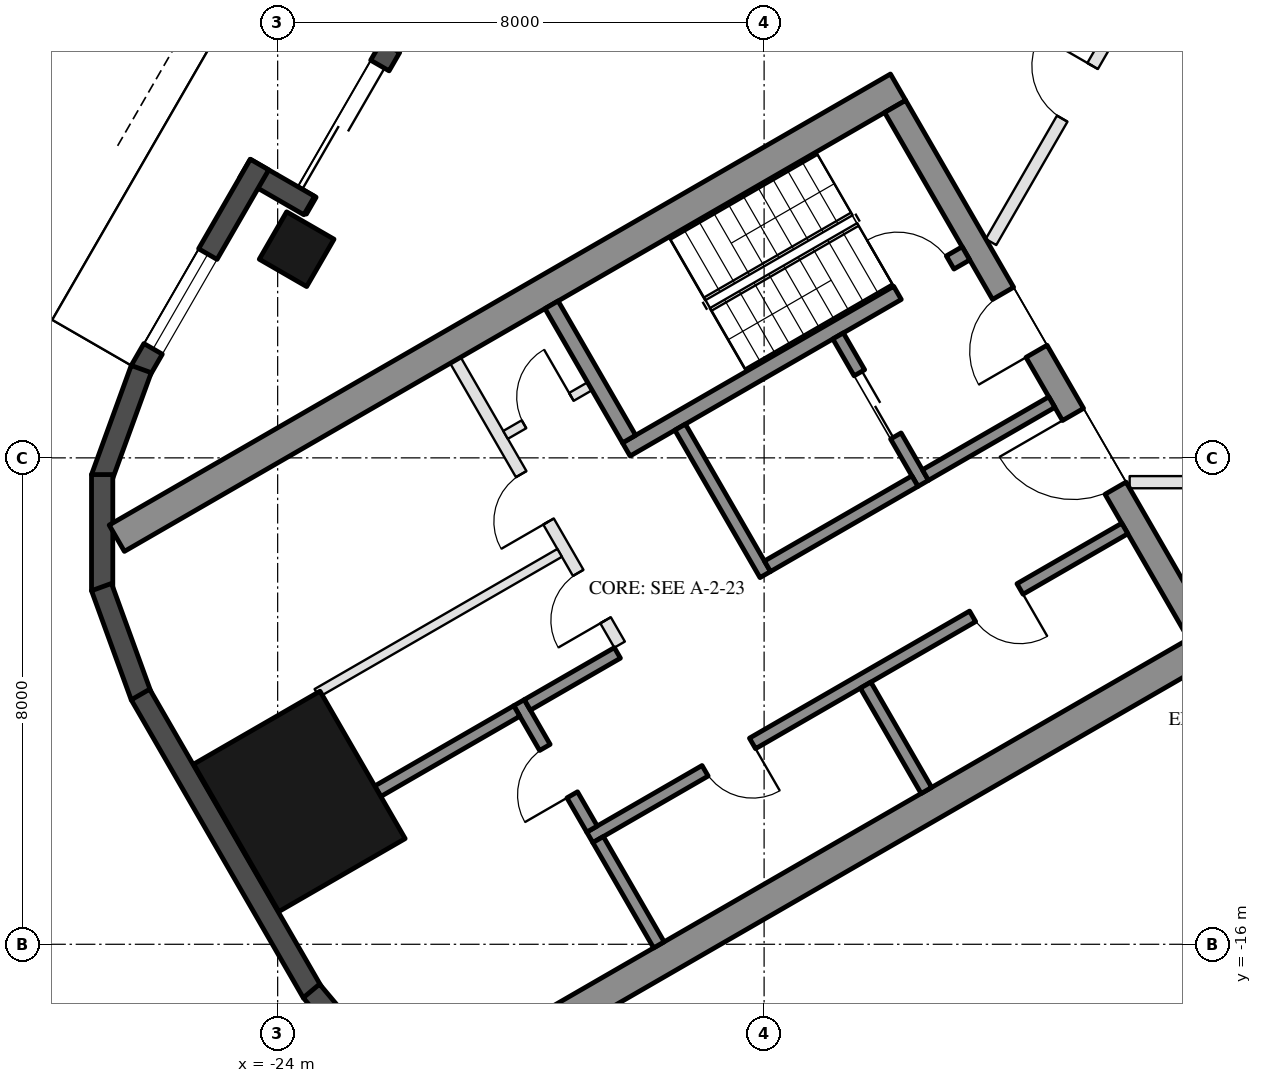
"""IFC4 building model, lengths in metres.
Left out: names, types, materials, properties, quantities, classifications, styles, units other than length and angle.
Written with IfcOpenShell. Run it as: python <this file> out.ifc"""

import sys

from ifc_helpers import new_model, si_unit, direction, frame, frame_2d, origin, origin_2d, place, context, subcontext, project, spatial, rectangle, hollow_rectangle, extrude, element, fill, save


model = new_model("IFC4")
c1 = context("Model", 3, precision=1e-05, world=origin(), true_north=direction((0.0, 1.0)))
c2 = subcontext(c1, "Body", "Model", "MODEL_VIEW")
j1 = project(units=[si_unit("LENGTHUNIT", "METRE"), si_unit("PLANEANGLEUNIT", "RADIAN")], contexts=[c1])
p1 = place(None, origin())
s1 = spatial("IfcSite", under=j1, at=p1, CompositionType="ELEMENT")
p2 = place(p1, origin())
s2 = spatial("IfcBuilding", under=s1, at=p2, CompositionType="ELEMENT")
p3 = place(p2, frame((0.0, 0.0, 105.7)))
s3 = spatial("IfcBuildingStorey", under=s2, at=p3, CompositionType="ELEMENT", Elevation=105.7)
p4 = place(p3, frame((-23.688, -4.568, 0.0), z_axis=(0.0, 0.0, 1.0), x_axis=(0.5, 0.866025403784, 0.0)))
e1 = element("IfcColumn", 1, at=p4, inside=s3, PredefinedType="COLUMN", context=c2, shape_type="SweptSolid", body=[
    extrude(hollow_rectangle(XDim=0.9, YDim=0.9, WallThickness=0.04, at=origin_2d()), origin(), (0.0, 0.0, 1.0), 3.7),
])
p5 = place(p3, frame((-23.643, -13.65, 0.0), z_axis=(0.0, 0.0, 1.0), x_axis=(-0.5, 0.866025403784, 0.0)))
e2 = element("IfcColumn", 2, at=p5, inside=s3, PredefinedType="COLUMN", context=c2, shape_type="SweptSolid", body=[
    extrude(hollow_rectangle(XDim=2.8, YDim=2.4, WallThickness=0.07, at=origin_2d()), origin(), (0.0, 0.0, 1.0), 3.7),
])
p6 = place(p3, frame((-20.309, 1.934, 0.0), z_axis=(0.0, 0.0, 1.0), x_axis=(-0.499992114976, -0.866029956157, 0.0)))
e3 = element("IfcWall", 3, at=p6, inside=s3, PredefinedType="SOLIDWALL", context=c2, shape_type="SweptSolid", body=[
    extrude(rectangle(XDim=6.74, YDim=0.35, at=frame_2d((3.37, 0.0))), origin(), (0.0, 0.0, 1.0), 3.55),
])
p7 = place(p6, frame((4.02, 0.0, 0.0)))
e4 = element("IfcOpeningElement", 4, at=p7, cuts=e3, PredefinedType="OPENING", context=c2, shape_type="SweptSolid", body=[
    extrude(rectangle(XDim=2.4, YDim=2.4, at=frame_2d((1.2, 1.2))), frame((0.0, 0.185, 0.0), z_axis=(0.0, -1.0, 0.0), x_axis=(1.0, 0.0, 0.0)), (0.0, 0.0, 1.0), 0.37),
])
p8 = place(p6, frame((0.77, 0.0, 0.3)))
e5 = element("IfcOpeningElement", 5, at=p8, cuts=e3, PredefinedType="OPENING", context=c2, shape_type="SweptSolid", body=[
    extrude(rectangle(XDim=2.9, YDim=2.65, at=frame_2d((1.45, 1.325))), frame((0.0, 0.185, 0.0), z_axis=(0.0, -1.0, 0.0), x_axis=(1.0, 0.0, 0.0)), (0.0, 0.0, 1.0), 0.37),
])
p9 = place(p3, frame((-23.481, -3.85, 0.0), z_axis=(0.0, 0.0, 1.0), x_axis=(-0.866092288191, 0.499884134912, 0.0)))
e6 = element("IfcWall", 6, at=p9, inside=s3, PredefinedType="SOLIDWALL", context=c2, shape_type="SweptSolid", body=[
    extrude(rectangle(XDim=1.22, YDim=0.35, at=frame_2d((0.61, 0.0))), origin(), (0.0, 0.0, 1.0), 3.55),
])
p10 = place(p3, frame((-24.299, -3.176, 0.0), z_axis=(0.0, 0.0, 1.0), x_axis=(-0.500028278809, -0.866009076391, 0.0)))
e7 = element("IfcWall", 7, at=p10, inside=s3, PredefinedType="SOLIDWALL", context=c2, shape_type="SweptSolid", body=[
    extrude(rectangle(XDim=3.916, YDim=0.35, at=frame_2d((1.958, 0.0))), origin(), (0.0, 0.0, 1.0), 3.55),
])
p11 = place(p10, frame((1.7, 0.0, 0.3)))
e8 = element("IfcOpeningElement", 8, at=p11, cuts=e7, PredefinedType="OPENING", context=c2, shape_type="SweptSolid", body=[
    extrude(rectangle(XDim=1.8, YDim=2.65, at=frame_2d((0.9, 1.325))), frame((0.0, 0.185, 0.0), z_axis=(0.0, -1.0, 0.0), x_axis=(1.0, 0.0, 0.0)), (0.0, 0.0, 1.0), 0.37),
])
for number, where, z_axis, x_axis in (
    (9, (-26.244, -6.54, 0.0), (0.0, 0.0, 1.0), (-0.342, -0.94, 0.0)),
    (10, (-26.886, -8.275, 0.0), (0.0, 0.0, 1.0), (0.0, -1.0, 0.0)),
    (11, (-26.897, -10.125, 0.0), (0.0, 0.0, 1.0), (0.342, -0.94, 0.0)),
):
    element("IfcWall", number, at=place(p3, frame(where, z_axis=z_axis, x_axis=x_axis)), inside=s3, PredefinedType="SOLIDWALL", context=c2, shape_type="SweptSolid", body=[
        extrude(rectangle(XDim=1.91, YDim=0.35, at=frame_2d((0.955, 0.0))), origin(), (0.0, 0.0, 1.0), 3.55),
    ])
p12 = place(p3, frame((-26.257, -11.893, 0.0), z_axis=(0.0, 0.0, 1.0), x_axis=(0.500018773155, -0.866014564827, 0.0)))
e12 = element("IfcWall", 12, at=p12, inside=s3, PredefinedType="SOLIDWALL", context=c2, shape_type="SweptSolid", body=[
    extrude(rectangle(XDim=5.658, YDim=0.35, at=frame_2d((2.829, 0.0))), origin(), (0.0, 0.0, 1.0), 3.55),
])
p13 = place(p3, frame((-23.445, -16.768, 0.0), z_axis=(0.0, 0.0, 1.0), x_axis=(0.642733291068, -0.76609001857, 0.0)))
e13 = element("IfcWall", 13, at=p13, inside=s3, PredefinedType="SOLIDWALL", context=c2, shape_type="SweptSolid", body=[
    extrude(rectangle(XDim=1.91, YDim=0.35, at=frame_2d((0.955, 0.0))), origin(), (0.0, 0.0, 1.0), 3.55),
])
for number, where, z_axis, x_axis in (
    (14, (-13.797, -1.903, 0.0), (0.0, 0.0, 1.0), (-0.866, -0.5, 0.0)),
    (15, (-8.547, -10.997, 0.0), (0.0, 0.0, 1.0), (-0.866, -0.5, 0.0)),
):
    element("IfcWall", number, at=place(p3, frame(where, z_axis=z_axis, x_axis=x_axis)), inside=s3, PredefinedType="SHEAR", context=c2, shape_type="SweptSolid", body=[
        extrude(rectangle(XDim=14.837, YDim=0.5, at=frame_2d((7.418, 0.0))), origin(), (0.0, 0.0, 1.0), 3.5),
    ])
p14 = place(p3, frame((-13.845, -2.22, 0.0), z_axis=(0.0, 0.0, 1.0), x_axis=(0.500004234368, -0.866022959057, 0.0)))
e16 = element("IfcWall", 16, at=p14, inside=s3, PredefinedType="SHEAR", context=c2, shape_type="SweptSolid", body=[
    extrude(rectangle(XDim=10.0, YDim=0.4, at=frame_2d((5.0, 0.0))), origin(), (0.0, 0.0, 1.0), 3.5),
])
p15 = place(p14, frame((3.55, 0.0, 0.0)))
e17 = element("IfcOpeningElement", 17, at=p15, cuts=e16, PredefinedType="OPENING", context=c2, shape_type="SweptSolid", body=[
    extrude(rectangle(XDim=1.1, YDim=2.1, at=frame_2d((0.55, 1.05))), frame((0.0, 0.21, 0.0), z_axis=(0.0, -1.0, 0.0), x_axis=(1.0, 0.0, 0.0)), (0.0, 0.0, 1.0), 0.42),
])
p16 = place(p14, frame((5.85, 0.0, 0.0)))
e18 = element("IfcOpeningElement", 18, at=p16, cuts=e16, PredefinedType="OPENING", context=c2, shape_type="SweptSolid", body=[
    extrude(rectangle(XDim=1.4, YDim=2.1, at=frame_2d((0.7, 1.05))), frame((0.0, 0.21, 0.0), z_axis=(0.0, -1.0, 0.0), x_axis=(1.0, 0.0, 0.0)), (0.0, 0.0, 1.0), 0.42),
])
p17 = place(p3, frame((-12.681, -4.636, 0.0), z_axis=(0.0, 0.0, 1.0), x_axis=(-0.866021702275, -0.500006411147, 0.0)))
e19 = element("IfcWall", 19, at=p17, inside=s3, PredefinedType="SHEAR", context=c2, shape_type="SweptSolid", body=[
    extrude(rectangle(XDim=6.45, YDim=0.25, at=frame_2d((3.225, 0.0))), origin(), (0.0, 0.0, 1.0), 3.5),
])
p18 = place(p17, frame((0.3, 0.0, 0.0)))
e20 = element("IfcOpeningElement", 20, at=p18, cuts=e19, PredefinedType="OPENING", context=c2, shape_type="SweptSolid", body=[
    extrude(rectangle(XDim=1.0, YDim=2.1, at=frame_2d((0.5, 1.05))), frame((0.0, 0.135, 0.0), z_axis=(0.0, -1.0, 0.0), x_axis=(1.0, 0.0, 0.0)), (0.0, 0.0, 1.0), 0.27),
])
p19 = place(p3, frame((-19.496, -5.482, 0.0), z_axis=(0.0, 0.0, 1.0), x_axis=(0.499990435942, -0.866030925526, 0.0)))
e21 = element("IfcWall", 21, at=p19, inside=s3, PredefinedType="SHEAR", context=c2, shape_type="SweptSolid", body=[
    extrude(rectangle(XDim=2.55, YDim=0.25, at=frame_2d((1.275, 0.0))), origin(), (0.0, 0.0, 1.0), 3.5),
])
p20 = place(p3, frame((-17.381, -7.495, 0.0), z_axis=(0.0, 0.0, 1.0), x_axis=(0.500011755427, -0.866018616679, 0.0)))
e22 = element("IfcWall", 22, at=p20, inside=s3, PredefinedType="SHEAR", context=c2, shape_type="SweptSolid", body=[
    extrude(rectangle(XDim=2.8, YDim=0.2, at=frame_2d((1.4, 0.0))), origin(), (0.0, 0.0, 1.0), 3.5),
])
p21 = place(p3, frame((-14.783, -5.995, 0.0), z_axis=(0.0, 0.0, 1.0), x_axis=(0.49994636267, -0.866056369097, 0.0)))
e23 = element("IfcWall", 23, at=p21, inside=s3, PredefinedType="SHEAR", context=c2, shape_type="SweptSolid", body=[
    extrude(rectangle(XDim=2.8, YDim=0.2, at=frame_2d((1.4, 0.0))), origin(), (0.0, 0.0, 1.0), 3.5),
])
p22 = place(p21, frame((0.7, 0.0, 0.0)))
e24 = element("IfcOpeningElement", 24, at=p22, cuts=e23, PredefinedType="OPENING", context=c2, shape_type="SweptSolid", body=[
    extrude(rectangle(XDim=1.2, YDim=2.1, at=frame_2d((0.6, 1.05))), frame((0.0, 0.11, 0.0), z_axis=(0.0, -1.0, 0.0), x_axis=(1.0, 0.0, 0.0)), (0.0, 0.0, 1.0), 0.22),
])
p23 = place(p3, frame((-13.52, -8.383, 0.0), z_axis=(0.0, 0.0, 1.0), x_axis=(-0.866034573852, -0.49998411664, 0.0)))
e25 = element("IfcWall", 25, at=p23, inside=s3, PredefinedType="SHEAR", context=c2, shape_type="SweptSolid", body=[
    extrude(rectangle(XDim=2.8, YDim=0.2, at=frame_2d((1.4, 0.0))), origin(), (0.0, 0.0, 1.0), 3.5),
])
p24 = place(p3, frame((-11.268, -7.083, 0.0), z_axis=(0.0, 0.0, 1.0), x_axis=(-0.866050077142, -0.499957262057, 0.0)))
e26 = element("IfcWall", 26, at=p24, inside=s3, PredefinedType="SHEAR", context=c2, shape_type="SweptSolid", body=[
    extrude(rectangle(XDim=2.4, YDim=0.2, at=frame_2d((1.2, 0.0))), origin(), (0.0, 0.0, 1.0), 3.5),
])
p25 = place(p3, frame((-10.068, -9.162, 0.0), z_axis=(0.0, 0.0, 1.0), x_axis=(-0.866032725843, -0.499987317609, 0.0)))
e27 = element("IfcWall", 27, at=p25, inside=s3, PredefinedType="SHEAR", context=c2, shape_type="SweptSolid", body=[
    extrude(rectangle(XDim=10.16, YDim=0.2, at=frame_2d((5.08, 0.0))), origin(), (0.0, 0.0, 1.0), 3.5),
])
p26 = place(p25, frame((1.99, 0.0, 0.0)))
e28 = element("IfcOpeningElement", 28, at=p26, cuts=e27, PredefinedType="OPENING", context=c2, shape_type="SweptSolid", body=[
    extrude(rectangle(XDim=0.9, YDim=2.1, at=frame_2d((0.45, 1.05))), frame((0.0, 0.11, 0.0), z_axis=(0.0, -1.0, 0.0), x_axis=(1.0, 0.0, 0.0)), (0.0, 0.0, 1.0), 0.22),
])
p27 = place(p25, frame((7.07, 0.0, 0.0)))
e29 = element("IfcOpeningElement", 29, at=p27, cuts=e27, PredefinedType="OPENING", context=c2, shape_type="SweptSolid", body=[
    extrude(rectangle(XDim=0.9, YDim=2.1, at=frame_2d((0.45, 1.05))), frame((0.0, 0.11, 0.0), z_axis=(0.0, -1.0, 0.0), x_axis=(1.0, 0.0, 0.0)), (0.0, 0.0, 1.0), 0.22),
])
p28 = place(p3, frame((-20.031, -12.026, 0.0), z_axis=(0.0, 0.0, 1.0), x_axis=(0.500033551112, -0.866006032174, 0.0)))
e30 = element("IfcWall", 30, at=p28, inside=s3, PredefinedType="SHEAR", context=c2, shape_type="SweptSolid", body=[
    extrude(rectangle(XDim=2.4, YDim=0.2, at=frame_2d((1.2, 0.0))), origin(), (0.0, 0.0, 1.0), 3.5),
])
p29 = place(p28, frame((0.85, 0.0, 0.0)))
e31 = element("IfcOpeningElement", 31, at=p29, cuts=e30, PredefinedType="OPENING", context=c2, shape_type="SweptSolid", body=[
    extrude(rectangle(XDim=0.9, YDim=2.1, at=frame_2d((0.45, 1.05))), frame((0.0, 0.11, 0.0), z_axis=(0.0, -1.0, 0.0), x_axis=(1.0, 0.0, 0.0)), (0.0, 0.0, 1.0), 0.22),
])
p30 = place(p3, frame((-18.413, -11.208, 0.0), z_axis=(0.0, 0.0, 1.0), x_axis=(-0.866038183914, -0.499977863513, 0.0)))
e32 = element("IfcWall", 32, at=p30, inside=s3, PredefinedType="SHEAR", context=c2, shape_type="SweptSolid", body=[
    extrude(rectangle(XDim=1.71, YDim=0.2, at=frame_2d((0.855, 0.0))), origin(), (0.0, 0.0, 1.0), 3.5),
])
for number, where, z_axis, x_axis in (
    (33, (-14.331, -11.738, 0.0), (0.0, 0.0, 1.0), (0.5, -0.866, 0.0)),
    (34, (-18.73, -14.278, 0.0), (0.0, 0.0, 1.0), (0.5, -0.866, 0.0)),
):
    element("IfcWall", number, at=place(p3, frame(where, z_axis=z_axis, x_axis=x_axis)), inside=s3, PredefinedType="SHEAR", context=c2, shape_type="SweptSolid", body=[
        extrude(rectangle(XDim=2.0, YDim=0.2, at=frame_2d((1.0, 0.0))), origin(), (0.0, 0.0, 1.0), 3.5),
    ])
p31 = place(p3, frame((-20.067, -12.163, 0.0), z_axis=(0.0, 0.0, 1.0), x_axis=(-0.866060851709, -0.499938597367, 0.0)))
e35 = element("IfcWall", 35, at=p31, inside=s3, PredefinedType="SHEAR", context=c2, shape_type="SweptSolid", body=[
    extrude(rectangle(XDim=2.64, YDim=0.2, at=frame_2d((1.32, 0.0))), origin(), (0.0, 0.0, 1.0), 3.5),
])
p32 = place(p3, frame((-21.076, -6.395, 0.0), z_axis=(0.0, 0.0, 1.0), x_axis=(0.50001468107, -0.866016927499, 0.0)))
e36 = element("IfcWall", 36, at=p32, inside=s3, PredefinedType="PARTITIONING", context=c2, shape_type="SweptSolid", body=[
    extrude(rectangle(XDim=5.4, YDim=0.2, at=frame_2d((2.7, 0.0))), origin(), (0.0, 0.0, 1.0), 3.5),
])
p33 = place(p32, frame((2.163, 0.0, 0.0)))
e37 = element("IfcOpeningElement", 37, at=p33, cuts=e36, PredefinedType="OPENING", context=c2, shape_type="SweptSolid", body=[
    extrude(rectangle(XDim=0.9, YDim=2.1, at=frame_2d((0.45, 1.05))), frame((0.0, 0.11, 0.0), z_axis=(0.0, -1.0, 0.0), x_axis=(1.0, 0.0, 0.0)), (0.0, 0.0, 1.0), 0.22),
])
p34 = place(p32, frame((4.038, 0.0, 0.0)))
e38 = element("IfcOpeningElement", 38, at=p34, cuts=e36, PredefinedType="OPENING", context=c2, shape_type="SweptSolid", body=[
    extrude(rectangle(XDim=0.9, YDim=2.1, at=frame_2d((0.45, 1.05))), frame((0.0, 0.11, 0.0), z_axis=(0.0, -1.0, 0.0), x_axis=(1.0, 0.0, 0.0)), (0.0, 0.0, 1.0), 0.22),
])
p35 = place(p3, frame((-18.866, -6.822, 0.0), z_axis=(0.0, 0.0, 1.0), x_axis=(-0.866028054938, -0.499995408039, 0.0)))
e39 = element("IfcWall", 39, at=p35, inside=s3, PredefinedType="PARTITIONING", context=c2, shape_type="SweptSolid", body=[
    extrude(rectangle(XDim=1.6, YDim=0.15, at=frame_2d((0.8, 0.0))), origin(), (0.0, 0.0, 1.0), 3.5),
])
p36 = place(p35, frame((0.35, 0.0, 0.0)))
e40 = element("IfcOpeningElement", 40, at=p36, cuts=e39, PredefinedType="OPENING", context=c2, shape_type="SweptSolid", body=[
    extrude(rectangle(XDim=0.9, YDim=2.1, at=frame_2d((0.45, 1.05))), frame((0.0, 0.085, 0.0), z_axis=(0.0, -1.0, 0.0), x_axis=(1.0, 0.0, 0.0)), (0.0, 0.0, 1.0), 0.17),
])
p37 = place(p3, frame((-19.363, -9.562, 0.0), z_axis=(0.0, 0.0, 1.0), x_axis=(-0.86601185002, -0.500023475074, 0.0)))
e41 = element("IfcWall", 41, at=p37, inside=s3, PredefinedType="PARTITIONING", context=c2, shape_type="SweptSolid", body=[
    extrude(rectangle(XDim=4.61, YDim=0.15, at=frame_2d((2.305, 0.0))), origin(), (0.0, 0.0, 1.0), 3.5),
])
p38 = place(p3, frame((-5.1, -8.4, 0.0), z_axis=(0.0, 0.0, 1.0), x_axis=(-1.0, 0.0, 0.0)))
e42 = element("IfcWall", 42, at=p38, inside=s3, PredefinedType="PARTITIONING", context=c2, shape_type="SweptSolid", body=[
    extrude(rectangle(XDim=4.888, YDim=0.2, at=frame_2d((2.444, 0.0))), origin(), (0.0, 0.0, 1.0), 2.95),
])
p39 = place(p38, frame((1.944, 0.0, 0.0)))
e43 = element("IfcOpeningElement", 43, at=p39, cuts=e42, PredefinedType="OPENING", context=c2, shape_type="SweptSolid", body=[
    extrude(rectangle(XDim=1.0, YDim=2.1, at=frame_2d((0.5, 1.05))), frame((0.0, 0.11, 0.0), z_axis=(0.0, -1.0, 0.0), x_axis=(1.0, 0.0, 0.0)), (0.0, 0.0, 1.0), 0.22),
])
p40 = place(p3, frame((-12.269, -4.45, 0.0), z_axis=(0.0, 0.0, 1.0), x_axis=(0.50001360338, 0.866017549727, 0.0)))
e44 = element("IfcWall", 44, at=p40, inside=s3, PredefinedType="PARTITIONING", context=c2, shape_type="SweptSolid", body=[
    extrude(rectangle(XDim=5.686, YDim=0.2, at=frame_2d((2.843, 0.0))), origin(), (0.0, 0.0, 1.0), 2.95),
])
p41 = place(p40, frame((2.343, 0.0, 0.0)))
e45 = element("IfcOpeningElement", 45, at=p41, cuts=e44, PredefinedType="OPENING", context=c2, shape_type="SweptSolid", body=[
    extrude(rectangle(XDim=1.0, YDim=2.1, at=frame_2d((0.5, 1.05))), frame((0.0, 0.11, 0.0), z_axis=(0.0, -1.0, 0.0), x_axis=(1.0, 0.0, 0.0)), (0.0, 0.0, 1.0), 0.22),
])
p42 = place(p7, frame((2.4, 0.0, 0.0), z_axis=(0.0, 0.0, 1.0), x_axis=(-1.0, 0.0, 0.0)))
e46 = element("IfcDoor", 46, at=p42, inside=s3, OperationType="SLIDING_TO_LEFT", PredefinedType="DOOR", context=c2, shape_type="SweptSolid", body=[
    extrude(rectangle(XDim=2.4, YDim=2.4, at=frame_2d((1.2, 1.2))), frame((0.0, 0.025, 0.0), z_axis=(0.0, -1.0, 0.0), x_axis=(1.0, 0.0, 0.0)), (0.0, 0.0, 1.0), 0.05),
])
fill(e4, e46)
p43 = place(p11, origin())
e47 = element("IfcWindow", 47, at=p43, inside=s3, PartitioningType="SINGLE_PANEL", PredefinedType="WINDOW", context=c2, shape_type="SweptSolid", body=[
    extrude(rectangle(XDim=1.8, YDim=2.65, at=frame_2d((0.9, 1.325))), frame((0.0, 0.03, 0.0), z_axis=(0.0, -1.0, 0.0), x_axis=(1.0, 0.0, 0.0)), (0.0, 0.0, 1.0), 0.06),
])
fill(e8, e47)
p44 = place(p22, origin())
e48 = element("IfcDoor", 48, at=p44, inside=s3, OperationType="DOUBLE_DOOR_SLIDING", PredefinedType="DOOR", context=c2, shape_type="SweptSolid", body=[
    extrude(rectangle(XDim=1.2, YDim=2.1, at=frame_2d((0.6, 1.05))), frame((0.0, 0.025, 0.0), z_axis=(0.0, -1.0, 0.0), x_axis=(1.0, 0.0, 0.0)), (0.0, 0.0, 1.0), 0.05),
])
fill(e24, e48)
p45 = place(p36, frame((0.9, 0.0, 0.0), z_axis=(0.0, 0.0, 1.0), x_axis=(-1.0, 0.0, 0.0)))
e49 = element("IfcDoor", 49, at=p45, inside=s3, OperationType="SINGLE_SWING_RIGHT", PredefinedType="DOOR", context=c2, shape_type="SweptSolid", body=[
    extrude(rectangle(XDim=0.9, YDim=2.1, at=frame_2d((0.45, 1.05))), frame((0.0, 0.025, 0.0), z_axis=(0.0, -1.0, 0.0), x_axis=(1.0, 0.0, 0.0)), (0.0, 0.0, 1.0), 0.05),
])
fill(e40, e49)
p46 = place(p26, origin())
e50 = element("IfcDoor", 50, at=p46, inside=s3, OperationType="SINGLE_SWING_LEFT", PredefinedType="DOOR", context=c2, shape_type="SweptSolid", body=[
    extrude(rectangle(XDim=0.9, YDim=2.1, at=frame_2d((0.45, 1.05))), frame((0.0, 0.025, 0.0), z_axis=(0.0, -1.0, 0.0), x_axis=(1.0, 0.0, 0.0)), (0.0, 0.0, 1.0), 0.05),
])
fill(e28, e50)
p47 = place(p27, origin())
e51 = element("IfcDoor", 51, at=p47, inside=s3, OperationType="SINGLE_SWING_LEFT", PredefinedType="DOOR", context=c2, shape_type="SweptSolid", body=[
    extrude(rectangle(XDim=0.9, YDim=2.1, at=frame_2d((0.45, 1.05))), frame((0.0, 0.025, 0.0), z_axis=(0.0, -1.0, 0.0), x_axis=(1.0, 0.0, 0.0)), (0.0, 0.0, 1.0), 0.05),
])
fill(e29, e51)
p48 = place(p29, frame((0.9, 0.0, 0.0), z_axis=(0.0, 0.0, 1.0), x_axis=(-1.0, 0.0, 0.0)))
e52 = element("IfcDoor", 52, at=p48, inside=s3, OperationType="SINGLE_SWING_LEFT", PredefinedType="DOOR", context=c2, shape_type="SweptSolid", body=[
    extrude(rectangle(XDim=0.9, YDim=2.1, at=frame_2d((0.45, 1.05))), frame((0.0, 0.025, 0.0), z_axis=(0.0, -1.0, 0.0), x_axis=(1.0, 0.0, 0.0)), (0.0, 0.0, 1.0), 0.05),
])
fill(e31, e52)
p49 = place(p33, frame((0.9, 0.0, 0.0), z_axis=(0.0, 0.0, 1.0), x_axis=(-1.0, 0.0, 0.0)))
e53 = element("IfcDoor", 53, at=p49, inside=s3, OperationType="SINGLE_SWING_LEFT", PredefinedType="DOOR", context=c2, shape_type="SweptSolid", body=[
    extrude(rectangle(XDim=0.9, YDim=2.1, at=frame_2d((0.45, 1.05))), frame((0.0, 0.025, 0.0), z_axis=(0.0, -1.0, 0.0), x_axis=(1.0, 0.0, 0.0)), (0.0, 0.0, 1.0), 0.05),
])
fill(e37, e53)
p50 = place(p34, frame((0.9, 0.0, 0.0), z_axis=(0.0, 0.0, 1.0), x_axis=(-1.0, 0.0, 0.0)))
e54 = element("IfcDoor", 54, at=p50, inside=s3, OperationType="SINGLE_SWING_LEFT", PredefinedType="DOOR", context=c2, shape_type="SweptSolid", body=[
    extrude(rectangle(XDim=0.9, YDim=2.1, at=frame_2d((0.45, 1.05))), frame((0.0, 0.025, 0.0), z_axis=(0.0, -1.0, 0.0), x_axis=(1.0, 0.0, 0.0)), (0.0, 0.0, 1.0), 0.05),
])
fill(e38, e54)
p51 = place(p15, frame((1.1, 0.0, 0.0), z_axis=(0.0, 0.0, 1.0), x_axis=(-1.0, 0.0, 0.0)))
e55 = element("IfcDoor", 55, at=p51, inside=s3, OperationType="SINGLE_SWING_LEFT", PredefinedType="DOOR", context=c2, shape_type="SweptSolid", body=[
    extrude(rectangle(XDim=1.1, YDim=2.1, at=frame_2d((0.55, 1.05))), frame((0.0, 0.025, 0.0), z_axis=(0.0, -1.0, 0.0), x_axis=(1.0, 0.0, 0.0)), (0.0, 0.0, 1.0), 0.05),
])
fill(e17, e55)
p52 = place(p16, frame((1.4, 0.0, 0.0), z_axis=(0.0, 0.0, 1.0), x_axis=(-1.0, 0.0, 0.0)))
e56 = element("IfcDoor", 56, at=p52, inside=s3, OperationType="DOUBLE_DOOR_SINGLE_SWING", PredefinedType="DOOR", context=c2, shape_type="SweptSolid", body=[
    extrude(rectangle(XDim=1.4, YDim=2.1, at=frame_2d((0.7, 1.05))), frame((0.0, 0.025, 0.0), z_axis=(0.0, -1.0, 0.0), x_axis=(1.0, 0.0, 0.0)), (0.0, 0.0, 1.0), 0.05),
])
fill(e18, e56)
p53 = place(p18, frame((1.0, 0.0, 0.0), z_axis=(0.0, 0.0, 1.0), x_axis=(-1.0, 0.0, 0.0)))
e57 = element("IfcDoor", 57, at=p53, inside=s3, OperationType="SINGLE_SWING_LEFT", PredefinedType="DOOR", context=c2, shape_type="SweptSolid", body=[
    extrude(rectangle(XDim=1.0, YDim=2.1, at=frame_2d((0.5, 1.05))), frame((0.0, 0.025, 0.0), z_axis=(0.0, -1.0, 0.0), x_axis=(1.0, 0.0, 0.0)), (0.0, 0.0, 1.0), 0.05),
])
fill(e20, e57)
p54 = place(p41, origin())
e58 = element("IfcDoor", 58, at=p54, inside=s3, OperationType="SINGLE_SWING_RIGHT", PredefinedType="DOOR", context=c2, shape_type="SweptSolid", body=[
    extrude(rectangle(XDim=1.0, YDim=2.1, at=frame_2d((0.5, 1.05))), frame((0.0, 0.025, 0.0), z_axis=(0.0, -1.0, 0.0), x_axis=(1.0, 0.0, 0.0)), (0.0, 0.0, 1.0), 0.05),
])
fill(e45, e58)
save(model, sys.argv[1])
